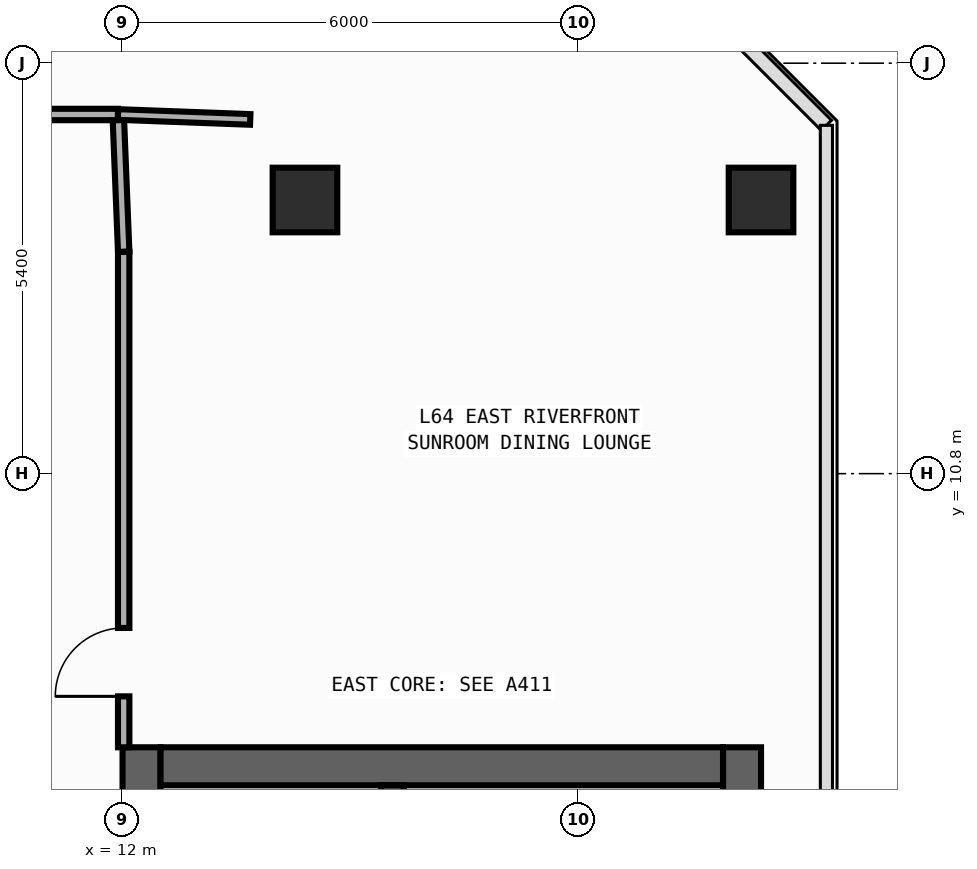
"""IFC4 building model, lengths in metres.
Left out: names, types, materials, properties, quantities, classifications, styles, units other than length and angle.
Written with IfcOpenShell. Run it as: python <this file> out.ifc"""

import sys

from ifc_helpers import new_model, si_unit, direction, frame, frame_2d, origin, origin_2d, place, context, subcontext, project, spatial, rectangle, extrude, element, fill, save


model = new_model("IFC4")
c1 = context("Model", 3, precision=1e-05, world=origin(), true_north=direction((0.0, 1.0)))
c2 = subcontext(c1, "Body", "Model", "MODEL_VIEW")
j1 = project(units=[si_unit("LENGTHUNIT", "METRE"), si_unit("PLANEANGLEUNIT", "RADIAN")], contexts=[c1])
p1 = place(None, origin())
s1 = spatial("IfcSite", under=j1, at=p1, CompositionType="ELEMENT")
p2 = place(p1, origin())
s2 = spatial("IfcBuilding", under=s1, at=p2, CompositionType="ELEMENT")
p3 = place(p2, frame((0.0, 0.0, 269.2)))
s3 = spatial("IfcBuildingStorey", under=s2, at=p3, CompositionType="ELEMENT", Elevation=269.2)
p4 = place(p3, frame((12.25, -19.8, 0.0), z_axis=(0.0, 0.0, 1.0), x_axis=(0.0, 1.0, 0.0)))
e1 = element("IfcWall", 1, at=p4, inside=s3, PredefinedType="SHEAR", context=c2, shape_type="SweptSolid", body=[
    extrude(rectangle(XDim=27.0, YDim=0.5, at=frame_2d((13.5, 0.0))), origin(), (0.0, 0.0, 1.0), 3.25),
])
p5 = place(p4, frame((23.05, 0.0, 0.0)))
e2 = element("IfcOpeningElement", 2, at=p5, cuts=e1, PredefinedType="OPENING", context=c2, shape_type="SweptSolid", body=[
    extrude(rectangle(XDim=1.1, YDim=2.2, at=frame_2d((0.55, 1.1))), frame((0.0, 0.26, 0.0), z_axis=(0.0, -1.0, 0.0), x_axis=(1.0, 0.0, 0.0)), (0.0, 0.0, 1.0), 0.52),
])
p6 = place(p4, frame((19.85, 0.0, 0.0)))
e3 = element("IfcOpeningElement", 3, at=p6, cuts=e1, PredefinedType="OPENING", context=c2, shape_type="SweptSolid", body=[
    extrude(rectangle(XDim=1.1, YDim=2.2, at=frame_2d((0.55, 1.1))), frame((0.0, 0.26, 0.0), z_axis=(0.0, -1.0, 0.0), x_axis=(1.0, 0.0, 0.0)), (0.0, 0.0, 1.0), 0.52),
])
p7 = place(p4, frame((16.65, 0.0, 0.0)))
e4 = element("IfcOpeningElement", 4, at=p7, cuts=e1, PredefinedType="OPENING", context=c2, shape_type="SweptSolid", body=[
    extrude(rectangle(XDim=1.1, YDim=2.2, at=frame_2d((0.55, 1.1))), frame((0.0, 0.26, 0.0), z_axis=(0.0, -1.0, 0.0), x_axis=(1.0, 0.0, 0.0)), (0.0, 0.0, 1.0), 0.52),
])
p8 = place(p4, frame((7.175, 0.0, 0.0)))
e5 = element("IfcOpeningElement", 5, at=p8, cuts=e1, PredefinedType="OPENING", context=c2, shape_type="SweptSolid", body=[
    extrude(rectangle(XDim=0.85, YDim=2.1, at=frame_2d((0.425, 1.05))), frame((0.0, 0.26, 0.0), z_axis=(0.0, -1.0, 0.0), x_axis=(1.0, 0.0, 0.0)), (0.0, 0.0, 1.0), 0.52),
])
p9 = place(p4, frame((10.375, 0.0, 0.0)))
e6 = element("IfcOpeningElement", 6, at=p9, cuts=e1, PredefinedType="OPENING", context=c2, shape_type="SweptSolid", body=[
    extrude(rectangle(XDim=0.85, YDim=2.1, at=frame_2d((0.425, 1.05))), frame((0.0, 0.26, 0.0), z_axis=(0.0, -1.0, 0.0), x_axis=(1.0, 0.0, 0.0)), (0.0, 0.0, 1.0), 0.52),
])
p10 = place(p4, frame((12.725, 0.0, 0.0)))
e7 = element("IfcOpeningElement", 7, at=p10, cuts=e1, PredefinedType="OPENING", context=c2, shape_type="SweptSolid", body=[
    extrude(rectangle(XDim=1.15, YDim=2.2, at=frame_2d((0.575, 1.1))), frame((0.0, 0.26, 0.0), z_axis=(0.0, -1.0, 0.0), x_axis=(1.0, 0.0, 0.0)), (0.0, 0.0, 1.0), 0.52),
])
p11 = place(p4, frame((25.125, 0.0, 0.0)))
e8 = element("IfcOpeningElement", 8, at=p11, cuts=e1, PredefinedType="OPENING", context=c2, shape_type="SweptSolid", body=[
    extrude(rectangle(XDim=0.85, YDim=2.1, at=frame_2d((0.425, 1.05))), frame((0.0, 0.26, 0.0), z_axis=(0.0, -1.0, 0.0), x_axis=(1.0, 0.0, 0.0)), (0.0, 0.0, 1.0), 0.52),
])
p12 = place(p3, frame((20.15, -19.8, 0.0), z_axis=(0.0, 0.0, 1.0), x_axis=(0.0, 1.0, 0.0)))
e9 = element("IfcWall", 9, at=p12, inside=s3, PredefinedType="SHEAR", context=c2, shape_type="SweptSolid", body=[
    extrude(rectangle(XDim=27.0, YDim=0.5, at=frame_2d((13.5, 0.0))), origin(), (0.0, 0.0, 1.0), 3.25),
])
p13 = place(p3, frame((12.5, 6.95, 0.0), z_axis=(0.0, 0.0, 1.0), x_axis=(1.0, 0.0, 0.0)))
e10 = element("IfcWall", 10, at=p13, inside=s3, PredefinedType="SHEAR", context=c2, shape_type="SweptSolid", body=[
    extrude(rectangle(XDim=7.4, YDim=0.5, at=frame_2d((3.7, 0.0))), origin(), (0.0, 0.0, 1.0), 3.25),
])
p14 = place(p3, frame((15.55, -19.3, 0.0), z_axis=(0.0, 0.0, 1.0), x_axis=(0.0, 1.0, 0.0)))
e11 = element("IfcWall", 11, at=p14, inside=s3, PredefinedType="SHEAR", context=c2, shape_type="SweptSolid", body=[
    extrude(rectangle(XDim=26.0, YDim=0.3, at=frame_2d((13.0, 0.0))), origin(), (0.0, 0.0, 1.0), 3.25),
])
p15 = place(p14, frame((12.225, 0.0, 0.0)))
e12 = element("IfcOpeningElement", 12, at=p15, cuts=e11, PredefinedType="OPENING", context=c2, shape_type="SweptSolid", body=[
    extrude(rectangle(XDim=1.15, YDim=2.2, at=frame_2d((0.575, 1.1))), frame((0.0, 0.16, 0.0), z_axis=(0.0, -1.0, 0.0), x_axis=(1.0, 0.0, 0.0)), (0.0, 0.0, 1.0), 0.32),
])
p16 = place(p14, frame((24.625, 0.0, 0.0)))
e13 = element("IfcOpeningElement", 13, at=p16, cuts=e11, PredefinedType="OPENING", context=c2, shape_type="SweptSolid", body=[
    extrude(rectangle(XDim=0.85, YDim=2.1, at=frame_2d((0.425, 1.05))), frame((0.0, 0.16, 0.0), z_axis=(0.0, -1.0, 0.0), x_axis=(1.0, 0.0, 0.0)), (0.0, 0.0, 1.0), 0.32),
])
for number, where, z_axis, x_axis in (
    (14, (20.4, 14.4, 0.0), (0.0, 0.0, 1.0), (1.0, 0.0, 0.0)),
    (15, (14.4, 14.4, 0.0), (0.0, 0.0, 1.0), (1.0, 0.0, 0.0)),
):
    element("IfcColumn", number, at=place(p3, frame(where, z_axis=z_axis, x_axis=x_axis)), inside=s3, PredefinedType="COLUMN", context=c2, shape_type="SweptSolid", body=[
        extrude(rectangle(XDim=0.85, YDim=0.85, at=origin_2d()), origin(), (0.0, 0.0, 1.0), 3.6),
    ])
p17 = place(p3, frame((12.015, 7.2, 0.0), z_axis=(0.0, 0.0, 1.0), x_axis=(0.0, 1.0, 0.0)))
e16 = element("IfcWall", 16, at=p17, inside=s3, PredefinedType="PARTITIONING", context=c2, shape_type="SweptSolid", body=[
    extrude(rectangle(XDim=6.52, YDim=0.15, at=frame_2d((3.26, 0.0))), origin(), (0.0, 0.0, 1.0), 3.25),
])
p18 = place(p17, frame((0.67, 0.0, 0.0)))
e17 = element("IfcOpeningElement", 17, at=p18, cuts=e16, PredefinedType="OPENING", context=c2, shape_type="SweptSolid", body=[
    extrude(rectangle(XDim=0.9, YDim=2.15, at=frame_2d((0.45, 1.075))), frame((0.0, 0.085, 0.0), z_axis=(0.0, -1.0, 0.0), x_axis=(1.0, 0.0, 0.0)), (0.0, 0.0, 1.0), 0.17),
])
p19 = place(p3, frame((3.855, 15.525, 0.0), z_axis=(0.0, 0.0, 1.0), x_axis=(1.0, 0.0, 0.0)))
e18 = element("IfcWall", 18, at=p19, inside=s3, PredefinedType="PARTITIONING", context=c2, shape_type="SweptSolid", body=[
    extrude(rectangle(XDim=8.085, YDim=0.15, at=frame_2d((4.042, 0.0))), origin(), (0.0, 0.0, 1.0), 3.25),
])
p20 = place(p3, frame((12.015, 13.72, 0.0), z_axis=(0.0, 0.0, 1.0), x_axis=(-0.040046877756, 0.99919780203, 0.0)))
e19 = element("IfcWall", 19, at=p20, inside=s3, PredefinedType="PARTITIONING", context=c2, shape_type="SweptSolid", body=[
    extrude(rectangle(XDim=1.731, YDim=0.15, at=frame_2d((0.866, 0.0))), origin(), (0.0, 0.0, 1.0), 3.25),
])
p21 = place(p3, frame((11.94, 15.525, 0.0), z_axis=(0.0, 0.0, 1.0), x_axis=(0.999304229002, -0.037296888581, 0.0)))
e20 = element("IfcWall", 20, at=p21, inside=s3, PredefinedType="PARTITIONING", context=c2, shape_type="SweptSolid", body=[
    extrude(rectangle(XDim=1.741, YDim=0.14, at=frame_2d((0.871, 0.0))), origin(), (0.0, 0.0, 1.0), 3.25),
])
p22 = place(p18, origin())
e21 = element("IfcDoor", 21, at=p22, inside=s3, OperationType="SINGLE_SWING_LEFT", PredefinedType="DOOR", context=c2, shape_type="SweptSolid", body=[
    extrude(rectangle(XDim=0.9, YDim=2.15, at=frame_2d((0.45, 1.075))), frame((0.0, 0.025, 0.0), z_axis=(0.0, -1.0, 0.0), x_axis=(1.0, 0.0, 0.0)), (0.0, 0.0, 1.0), 0.05),
])
fill(e17, e21)
save(model, sys.argv[1])
